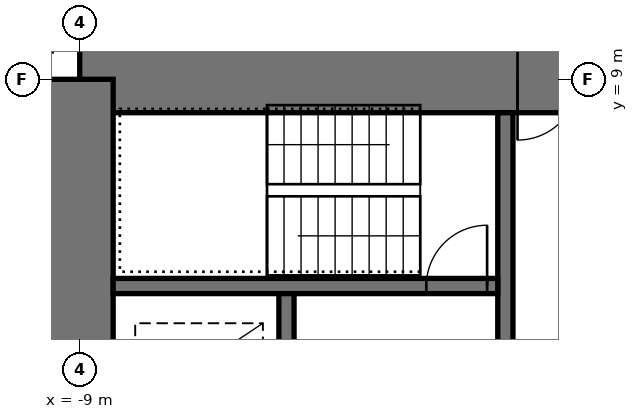
"""IFC4 building model, lengths in metres.
Left out: names, types, materials, properties, quantities, classifications, styles, units other than length and angle.
Written with IfcOpenShell. Run it as: python <this file> out.ifc"""

import sys

from ifc_helpers import new_model, si_unit, direction, frame, frame_2d, origin, place, context, subcontext, project, spatial, rectangle, extrude, element, fill, save


model = new_model("IFC4")
c1 = context("Model", 3, precision=1e-05, world=origin(), true_north=direction((0.0, 1.0)))
c2 = subcontext(c1, "Body", "Model", "MODEL_VIEW")
j1 = project(units=[si_unit("LENGTHUNIT", "METRE"), si_unit("PLANEANGLEUNIT", "RADIAN")], contexts=[c1])
p1 = place(None, origin())
s1 = spatial("IfcSite", under=j1, at=p1, CompositionType="ELEMENT")
p2 = place(p1, origin())
s2 = spatial("IfcBuilding", under=s1, at=p2, CompositionType="ELEMENT")
p3 = place(p2, frame((0.0, 0.0, 213.7)))
s3 = spatial("IfcBuildingStorey", under=s2, at=p3, CompositionType="ELEMENT", Elevation=213.7)
p4 = place(p3, frame((9.0, 9.0, 0.0), z_axis=(0.0, 0.0, 1.0), x_axis=(-1.0, 0.0, 0.0)))
e1 = element("IfcWall", 1, at=p4, inside=s3, PredefinedType="SHEAR", context=c2, shape_type="SweptSolid", body=[
    extrude(rectangle(XDim=18.0, YDim=1.1, at=frame_2d((9.0, 0.0))), origin(), (0.0, 0.0, 1.0), 3.4),
])
p5 = place(p4, frame((9.8, 0.0, 0.0)))
e2 = element("IfcOpeningElement", 2, at=p5, cuts=e1, PredefinedType="OPENING", context=c2, shape_type="SweptSolid", body=[
    extrude(rectangle(XDim=1.0, YDim=2.4, at=frame_2d((0.5, 1.2))), frame((0.0, 0.56, 0.0), z_axis=(0.0, -1.0, 0.0), x_axis=(1.0, 0.0, 0.0)), (0.0, 0.0, 1.0), 1.12),
])
p6 = place(p3, frame((-9.0, 9.0, 0.0), z_axis=(0.0, 0.0, 1.0), x_axis=(0.0, -1.0, 0.0)))
e3 = element("IfcWall", 3, at=p6, inside=s3, PredefinedType="SHEAR", context=c2, shape_type="SweptSolid", body=[
    extrude(rectangle(XDim=18.0, YDim=1.1, at=frame_2d((9.0, 0.0))), origin(), (0.0, 0.0, 1.0), 3.4),
])
p7 = place(p6, frame((9.8, 0.0, 0.0)))
e4 = element("IfcOpeningElement", 4, at=p7, cuts=e3, PredefinedType="OPENING", context=c2, shape_type="SweptSolid", body=[
    extrude(rectangle(XDim=1.0, YDim=2.4, at=frame_2d((0.5, 1.2))), frame((0.0, 0.56, 0.0), z_axis=(0.0, -1.0, 0.0), x_axis=(1.0, 0.0, 0.0)), (0.0, 0.0, 1.0), 1.12),
])
p8 = place(p3, frame((-2.0, 1.675, 0.0), z_axis=(0.0, 0.0, 1.0), x_axis=(0.0, 1.0, 0.0)))
e5 = element("IfcWall", 5, at=p8, inside=s3, PredefinedType="SHEAR", context=c2, shape_type="SweptSolid", body=[
    extrude(rectangle(XDim=6.775, YDim=0.25, at=frame_2d((3.387, 0.0))), origin(), (0.0, 0.0, 1.0), 3.4),
])
p9 = place(p8, frame((0.725, 0.0, 0.0)))
e6 = element("IfcOpeningElement", 6, at=p9, cuts=e5, PredefinedType="OPENING", context=c2, shape_type="SweptSolid", body=[
    extrude(rectangle(XDim=1.0, YDim=2.1, at=frame_2d((0.5, 1.05))), frame((0.0, 0.135, 0.0), z_axis=(0.0, -1.0, 0.0), x_axis=(1.0, 0.0, 0.0)), (0.0, 0.0, 1.0), 0.27),
])
p10 = place(p3, frame((-2.125, 5.6, 0.0), z_axis=(0.0, 0.0, 1.0), x_axis=(-1.0, 0.0, 0.0)))
e7 = element("IfcWall", 7, at=p10, inside=s3, PredefinedType="SHEAR", context=c2, shape_type="SweptSolid", body=[
    extrude(rectangle(XDim=6.325, YDim=0.25, at=frame_2d((3.163, 0.0))), origin(), (0.0, 0.0, 1.0), 3.4),
])
p11 = place(p10, frame((0.175, 0.0, 0.0)))
e8 = element("IfcOpeningElement", 8, at=p11, cuts=e7, PredefinedType="OPENING", context=c2, shape_type="SweptSolid", body=[
    extrude(rectangle(XDim=1.0, YDim=2.1, at=frame_2d((0.5, 1.05))), frame((0.0, 0.135, 0.0), z_axis=(0.0, -1.0, 0.0), x_axis=(1.0, 0.0, 0.0)), (0.0, 0.0, 1.0), 0.27),
])
p12 = place(p3, frame((-5.6, 1.925, 0.0), z_axis=(0.0, 0.0, 1.0), x_axis=(0.0, 1.0, 0.0)))
e9 = element("IfcWall", 9, at=p12, inside=s3, PredefinedType="SHEAR", context=c2, shape_type="SweptSolid", body=[
    extrude(rectangle(XDim=3.55, YDim=0.25, at=frame_2d((1.775, 0.0))), origin(), (0.0, 0.0, 1.0), 3.4),
])
p13 = place(p12, frame((1.525, 0.0, 0.0)))
e10 = element("IfcOpeningElement", 10, at=p13, cuts=e9, PredefinedType="OPENING", context=c2, shape_type="SweptSolid", body=[
    extrude(rectangle(XDim=1.1, YDim=2.2, at=frame_2d((0.55, 1.1))), frame((0.0, 0.135, 0.0), z_axis=(0.0, -1.0, 0.0), x_axis=(1.0, 0.0, 0.0)), (0.0, 0.0, 1.0), 0.27),
])
p14 = place(p12, frame((0.075, 0.0, 0.0)))
e11 = element("IfcOpeningElement", 11, at=p14, cuts=e9, PredefinedType="OPENING", context=c2, shape_type="SweptSolid", body=[
    extrude(rectangle(XDim=0.8, YDim=2.1, at=frame_2d((0.4, 1.05))), frame((0.0, 0.135, 0.0), z_axis=(0.0, -1.0, 0.0), x_axis=(1.0, 0.0, 0.0)), (0.0, 0.0, 1.0), 0.27),
])
p15 = place(p3, frame((-9.445, 9.57, 0.0), z_axis=(0.0, 0.0, 1.0), x_axis=(-1.0, 0.0, 0.0)))
e12 = element("IfcWall", 12, at=p15, inside=s3, PredefinedType="SOLIDWALL", context=c2, shape_type="SweptSolid", body=[
    extrude(rectangle(XDim=3.125, YDim=0.25, at=frame_2d((1.562, 0.0))), origin(), (0.0, 0.0, 1.0), 3.15),
])
p16 = place(p15, frame((0.6, 0.0, 0.0)))
e13 = element("IfcOpeningElement", 13, at=p16, cuts=e12, PredefinedType="OPENING", context=c2, shape_type="SweptSolid", body=[
    extrude(rectangle(XDim=1.0, YDim=2.2, at=frame_2d((0.5, 1.1))), frame((0.0, 0.135, 0.0), z_axis=(0.0, -1.0, 0.0), x_axis=(1.0, 0.0, 0.0)), (0.0, 0.0, 1.0), 0.27),
])
p17 = place(p5, origin())
e14 = element("IfcDoor", 14, at=p17, inside=s3, OperationType="SINGLE_SWING_RIGHT", PredefinedType="DOOR", context=c2, shape_type="SweptSolid", body=[
    extrude(rectangle(XDim=1.0, YDim=2.4, at=frame_2d((0.5, 1.2))), frame((0.0, 0.055, 0.0), z_axis=(0.0, -1.0, 0.0), x_axis=(1.0, 0.0, 0.0)), (0.0, 0.0, 1.0), 0.05),
])
fill(e2, e14)
p18 = place(p11, frame((1.0, 0.0, 0.0), z_axis=(0.0, 0.0, 1.0), x_axis=(-1.0, 0.0, 0.0)))
e15 = element("IfcDoor", 15, at=p18, inside=s3, OperationType="SINGLE_SWING_RIGHT", PredefinedType="DOOR", context=c2, shape_type="SweptSolid", body=[
    extrude(rectangle(XDim=1.0, YDim=2.1, at=frame_2d((0.5, 1.05))), frame((0.0, 0.025, 0.0), z_axis=(0.0, -1.0, 0.0), x_axis=(1.0, 0.0, 0.0)), (0.0, 0.0, 1.0), 0.05),
])
fill(e8, e15)
save(model, sys.argv[1])
